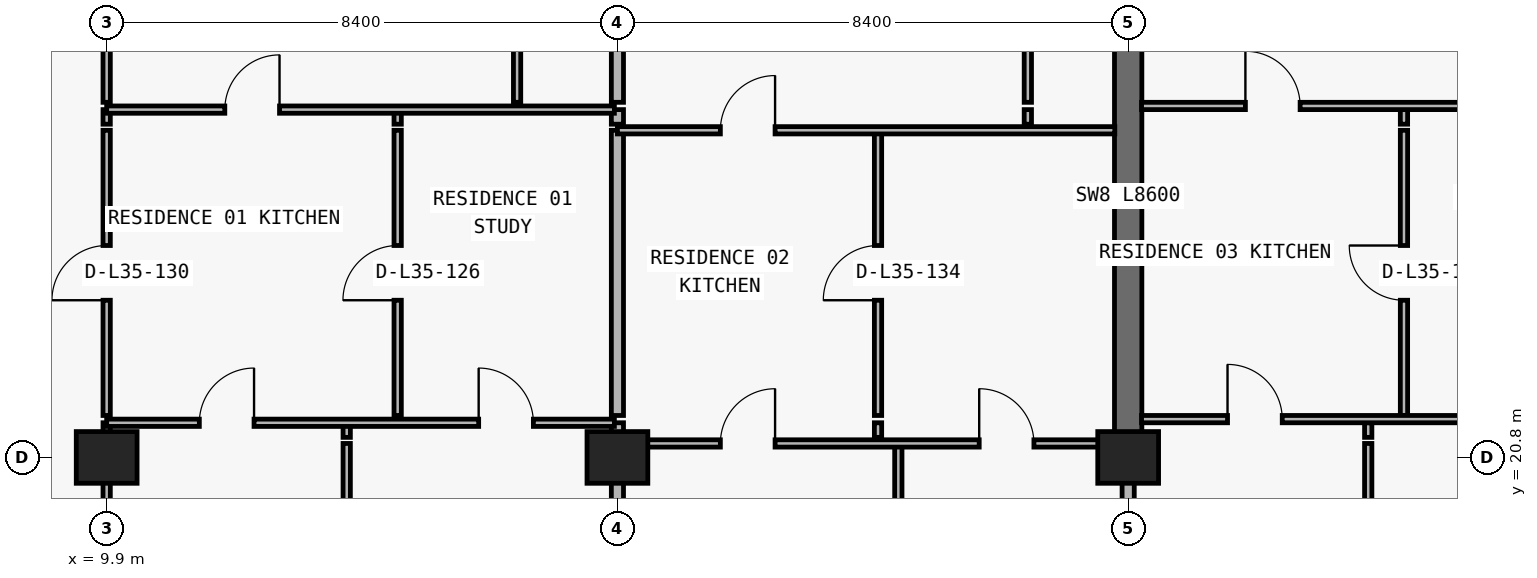
"""IFC4 building model, lengths in metres.
Left out: names, types, materials, properties, quantities, classifications, styles, units other than length and angle.
Written with IfcOpenShell. Run it as: python <this file> out.ifc"""

import sys

from ifc_helpers import new_model, si_unit, direction, frame, frame_2d, origin, origin_2d, place, context, subcontext, project, spatial, rectangle, extrude, element, fill, save


model = new_model("IFC4")
c1 = context("Model", 3, precision=1e-05, world=origin(), true_north=direction((0.0, 1.0)))
c2 = subcontext(c1, "Body", "Model", "MODEL_VIEW")
j1 = project(units=[si_unit("LENGTHUNIT", "METRE"), si_unit("PLANEANGLEUNIT", "RADIAN")], contexts=[c1])
p1 = place(None, origin())
s1 = spatial("IfcSite", under=j1, at=p1, CompositionType="ELEMENT")
p2 = place(p1, origin())
s2 = spatial("IfcBuilding", under=s1, at=p2, CompositionType="ELEMENT")
p3 = place(p2, frame((0.0, 0.0, 129.0)))
s3 = spatial("IfcBuildingStorey", under=s2, at=p3, CompositionType="ELEMENT", Elevation=129.0)
for number, where, z_axis, x_axis in (
    (1, (9.9, 20.8, 0.0), (0.0, 0.0, 1.0), (1.0, 0.0, 0.0)),
    (2, (18.3, 20.8, 0.0), (0.0, 0.0, 1.0), (1.0, 0.0, 0.0)),
    (3, (26.7, 20.8, 0.0), (0.0, 0.0, 1.0), (1.0, 0.0, 0.0)),
):
    element("IfcColumn", number, at=place(p3, frame(where, z_axis=z_axis, x_axis=x_axis)), inside=s3, PredefinedType="COLUMN", context=c2, shape_type="SweptSolid", body=[
        extrude(rectangle(XDim=1.0, YDim=0.85, at=origin_2d()), origin(), (0.0, 0.0, 1.0), 3.05),
    ])
p4 = place(p3, frame((26.7, 20.8, 0.0), z_axis=(0.0, 0.0, 1.0), x_axis=(0.0, 1.0, 0.0)))
e4 = element("IfcWall", 4, at=p4, inside=s3, PredefinedType="SHEAR", context=c2, shape_type="SweptSolid", body=[
    extrude(rectangle(XDim=8.6, YDim=0.45, at=frame_2d((4.3, 0.0))), origin(), (0.0, 0.0, 1.0), 3.05),
])
p5 = place(p3, frame((9.9, 8.84, 0.0), z_axis=(0.0, 0.0, 1.0), x_axis=(0.0, 1.0, 0.0)))
e5 = element("IfcWall", 5, at=p5, inside=s3, PredefinedType="PARTITIONING", context=c2, shape_type="SweptSolid", body=[
    extrude(rectangle(XDim=12.19, YDim=0.12, at=frame_2d((6.095, 0.0))), origin(), (0.0, 0.0, 1.0), 2.174),
])
p6 = place(p3, frame((9.9, 21.13, 0.0), z_axis=(0.0, 0.0, 1.0), x_axis=(0.0, 1.0, 0.0)))
e6 = element("IfcWall", 6, at=p6, inside=s3, PredefinedType="PARTITIONING", context=c2, shape_type="SweptSolid", body=[
    extrude(rectangle(XDim=0.24, YDim=0.12, at=frame_2d((0.12, 0.0))), origin(), (0.0, 0.0, 1.0), 2.174),
])
p7 = place(p3, frame((9.9, 21.49, 0.0), z_axis=(0.0, 0.0, 1.0), x_axis=(0.0, 1.0, 0.0)))
e7 = element("IfcWall", 7, at=p7, inside=s3, PredefinedType="PARTITIONING", context=c2, shape_type="SweptSolid", body=[
    extrude(rectangle(XDim=4.69, YDim=0.12, at=frame_2d((2.345, 0.0))), origin(), (0.0, 0.0, 1.0), 2.174),
])
p8 = place(p7, frame((1.895, 0.0, 0.0)))
e8 = element("IfcOpeningElement", 8, at=p8, cuts=e7, PredefinedType="OPENING", context=c2, shape_type="SweptSolid", body=[
    extrude(rectangle(XDim=0.9, YDim=2.124, at=frame_2d((0.45, 1.062))), frame((0.0, 0.07, 0.0), z_axis=(0.0, -1.0, 0.0), x_axis=(1.0, 0.0, 0.0)), (0.0, 0.0, 1.0), 0.14),
])
p9 = place(p3, frame((9.9, 26.28, 0.0), z_axis=(0.0, 0.0, 1.0), x_axis=(0.0, 1.0, 0.0)))
e9 = element("IfcWall", 9, at=p9, inside=s3, PredefinedType="PARTITIONING", context=c2, shape_type="SweptSolid", body=[
    extrude(rectangle(XDim=0.24, YDim=0.12, at=frame_2d((0.12, 0.0))), origin(), (0.0, 0.0, 1.0), 2.174),
])
p10 = place(p3, frame((9.9, 26.64, 0.0), z_axis=(0.0, 0.0, 1.0), x_axis=(0.0, 1.0, 0.0)))
e10 = element("IfcWall", 10, at=p10, inside=s3, PredefinedType="PARTITIONING", context=c2, shape_type="SweptSolid", body=[
    extrude(rectangle(XDim=8.06, YDim=0.12, at=frame_2d((4.03, 0.0))), origin(), (0.0, 0.0, 1.0), 2.174),
])
p11 = place(p3, frame((13.848, 8.84, 0.0), z_axis=(0.0, 0.0, 1.0), x_axis=(0.0, 1.0, 0.0)))
e11 = element("IfcWall", 11, at=p11, inside=s3, PredefinedType="PARTITIONING", context=c2, shape_type="SweptSolid", body=[
    extrude(rectangle(XDim=12.19, YDim=0.12, at=frame_2d((6.095, 0.0))), origin(), (0.0, 0.0, 1.0), 3.05),
])
p12 = place(p3, frame((13.848, 21.13, 0.0), z_axis=(0.0, 0.0, 1.0), x_axis=(0.0, 1.0, 0.0)))
e12 = element("IfcWall", 12, at=p12, inside=s3, PredefinedType="PARTITIONING", context=c2, shape_type="SweptSolid", body=[
    extrude(rectangle(XDim=0.24, YDim=0.12, at=frame_2d((0.12, 0.0))), origin(), (0.0, 0.0, 1.0), 3.05),
])
p13 = place(p3, frame((14.686, 21.49, 0.0), z_axis=(0.0, 0.0, 1.0), x_axis=(0.0, 1.0, 0.0)))
e13 = element("IfcWall", 13, at=p13, inside=s3, PredefinedType="PARTITIONING", context=c2, shape_type="SweptSolid", body=[
    extrude(rectangle(XDim=4.69, YDim=0.12, at=frame_2d((2.345, 0.0))), origin(), (0.0, 0.0, 1.0), 3.05),
])
p14 = place(p13, frame((1.895, 0.0, 0.0)))
e14 = element("IfcOpeningElement", 14, at=p14, cuts=e13, PredefinedType="OPENING", context=c2, shape_type="SweptSolid", body=[
    extrude(rectangle(XDim=0.9, YDim=2.15, at=frame_2d((0.45, 1.075))), frame((0.0, 0.07, 0.0), z_axis=(0.0, -1.0, 0.0), x_axis=(1.0, 0.0, 0.0)), (0.0, 0.0, 1.0), 0.14),
])
p15 = place(p3, frame((14.686, 26.28, 0.0), z_axis=(0.0, 0.0, 1.0), x_axis=(0.0, 1.0, 0.0)))
e15 = element("IfcWall", 15, at=p15, inside=s3, PredefinedType="PARTITIONING", context=c2, shape_type="SweptSolid", body=[
    extrude(rectangle(XDim=0.24, YDim=0.12, at=frame_2d((0.12, 0.0))), origin(), (0.0, 0.0, 1.0), 3.05),
])
p16 = place(p3, frame((16.65, 26.64, 0.0), z_axis=(0.0, 0.0, 1.0), x_axis=(0.0, 1.0, 0.0)))
e16 = element("IfcWall", 16, at=p16, inside=s3, PredefinedType="PARTITIONING", context=c2, shape_type="SweptSolid", body=[
    extrude(rectangle(XDim=8.06, YDim=0.12, at=frame_2d((4.03, 0.0))), origin(), (0.0, 0.0, 1.0), 3.05),
])
p17 = place(p16, frame((3.755, 0.0, 0.0)))
e17 = element("IfcOpeningElement", 17, at=p17, cuts=e16, PredefinedType="OPENING", context=c2, shape_type="SweptSolid", body=[
    extrude(rectangle(XDim=0.85, YDim=2.1, at=frame_2d((0.425, 1.05))), frame((0.0, 0.07, 0.0), z_axis=(0.0, -1.0, 0.0), x_axis=(1.0, 0.0, 0.0)), (0.0, 0.0, 1.0), 0.14),
])
p18 = place(p3, frame((18.3, 8.84, 0.0), z_axis=(0.0, 0.0, 1.0), x_axis=(0.0, 1.0, 0.0)))
e18 = element("IfcWall", 18, at=p18, inside=s3, PredefinedType="PARTITIONING", context=c2, shape_type="SweptSolid", body=[
    extrude(rectangle(XDim=12.19, YDim=0.2, at=frame_2d((6.095, 0.0))), origin(), (0.0, 0.0, 1.0), 2.174),
])
p19 = place(p3, frame((18.3, 21.13, 0.0), z_axis=(0.0, 0.0, 1.0), x_axis=(0.0, 1.0, 0.0)))
e19 = element("IfcWall", 19, at=p19, inside=s3, PredefinedType="PARTITIONING", context=c2, shape_type="SweptSolid", body=[
    extrude(rectangle(XDim=0.24, YDim=0.2, at=frame_2d((0.12, 0.0))), origin(), (0.0, 0.0, 1.0), 2.174),
])
p20 = place(p3, frame((18.3, 21.49, 0.0), z_axis=(0.0, 0.0, 1.0), x_axis=(0.0, 1.0, 0.0)))
e20 = element("IfcWall", 20, at=p20, inside=s3, PredefinedType="PARTITIONING", context=c2, shape_type="SweptSolid", body=[
    extrude(rectangle(XDim=4.69, YDim=0.2, at=frame_2d((2.345, 0.0))), origin(), (0.0, 0.0, 1.0), 2.174),
])
p21 = place(p3, frame((18.3, 26.28, 0.0), z_axis=(0.0, 0.0, 1.0), x_axis=(0.0, 1.0, 0.0)))
e21 = element("IfcWall", 21, at=p21, inside=s3, PredefinedType="PARTITIONING", context=c2, shape_type="SweptSolid", body=[
    extrude(rectangle(XDim=0.24, YDim=0.2, at=frame_2d((0.12, 0.0))), origin(), (0.0, 0.0, 1.0), 2.174),
])
p22 = place(p3, frame((18.3, 26.64, 0.0), z_axis=(0.0, 0.0, 1.0), x_axis=(0.0, 1.0, 0.0)))
e22 = element("IfcWall", 22, at=p22, inside=s3, PredefinedType="PARTITIONING", context=c2, shape_type="SweptSolid", body=[
    extrude(rectangle(XDim=8.06, YDim=0.2, at=frame_2d((4.03, 0.0))), origin(), (0.0, 0.0, 1.0), 2.174),
])
p23 = place(p3, frame((22.586, 21.13, 0.0), z_axis=(0.0, 0.0, 1.0), x_axis=(0.0, 1.0, 0.0)))
e23 = element("IfcWall", 23, at=p23, inside=s3, PredefinedType="PARTITIONING", context=c2, shape_type="SweptSolid", body=[
    extrude(rectangle(XDim=0.24, YDim=0.12, at=frame_2d((0.12, 0.0))), origin(), (0.0, 0.0, 1.0), 3.05),
])
p24 = place(p3, frame((22.586, 21.49, 0.0), z_axis=(0.0, 0.0, 1.0), x_axis=(0.0, 1.0, 0.0)))
e24 = element("IfcWall", 24, at=p24, inside=s3, PredefinedType="PARTITIONING", context=c2, shape_type="SweptSolid", body=[
    extrude(rectangle(XDim=4.69, YDim=0.12, at=frame_2d((2.345, 0.0))), origin(), (0.0, 0.0, 1.0), 3.05),
])
p25 = place(p24, frame((1.895, 0.0, 0.0)))
e25 = element("IfcOpeningElement", 25, at=p25, cuts=e24, PredefinedType="OPENING", context=c2, shape_type="SweptSolid", body=[
    extrude(rectangle(XDim=0.9, YDim=2.15, at=frame_2d((0.45, 1.075))), frame((0.0, 0.07, 0.0), z_axis=(0.0, -1.0, 0.0), x_axis=(1.0, 0.0, 0.0)), (0.0, 0.0, 1.0), 0.14),
])
p26 = place(p3, frame((22.92, 8.84, 0.0), z_axis=(0.0, 0.0, 1.0), x_axis=(0.0, 1.0, 0.0)))
e26 = element("IfcWall", 26, at=p26, inside=s3, PredefinedType="PARTITIONING", context=c2, shape_type="SweptSolid", body=[
    extrude(rectangle(XDim=12.19, YDim=0.12, at=frame_2d((6.095, 0.0))), origin(), (0.0, 0.0, 1.0), 3.05),
])
p27 = place(p3, frame((25.05, 26.28, 0.0), z_axis=(0.0, 0.0, 1.0), x_axis=(0.0, 1.0, 0.0)))
e27 = element("IfcWall", 27, at=p27, inside=s3, PredefinedType="PARTITIONING", context=c2, shape_type="SweptSolid", body=[
    extrude(rectangle(XDim=0.24, YDim=0.12, at=frame_2d((0.12, 0.0))), origin(), (0.0, 0.0, 1.0), 3.05),
])
p28 = place(p3, frame((25.05, 26.64, 0.0), z_axis=(0.0, 0.0, 1.0), x_axis=(0.0, 1.0, 0.0)))
e28 = element("IfcWall", 28, at=p28, inside=s3, PredefinedType="PARTITIONING", context=c2, shape_type="SweptSolid", body=[
    extrude(rectangle(XDim=8.06, YDim=0.12, at=frame_2d((4.03, 0.0))), origin(), (0.0, 0.0, 1.0), 3.05),
])
p29 = place(p28, frame((3.755, 0.0, 0.0)))
e29 = element("IfcOpeningElement", 29, at=p29, cuts=e28, PredefinedType="OPENING", context=c2, shape_type="SweptSolid", body=[
    extrude(rectangle(XDim=0.85, YDim=2.1, at=frame_2d((0.425, 1.05))), frame((0.0, 0.07, 0.0), z_axis=(0.0, -1.0, 0.0), x_axis=(1.0, 0.0, 0.0)), (0.0, 0.0, 1.0), 0.14),
])
p30 = place(p3, frame((26.7, 8.84, 0.0), z_axis=(0.0, 0.0, 1.0), x_axis=(0.0, 1.0, 0.0)))
e30 = element("IfcWall", 30, at=p30, inside=s3, PredefinedType="PARTITIONING", context=c2, shape_type="SweptSolid", body=[
    extrude(rectangle(XDim=11.955, YDim=0.2, at=frame_2d((5.978, 0.0))), origin(), (0.0, 0.0, 1.0), 2.174),
])
p31 = place(p3, frame((30.648, 8.84, 0.0), z_axis=(0.0, 0.0, 1.0), x_axis=(0.0, 1.0, 0.0)))
e31 = element("IfcWall", 31, at=p31, inside=s3, PredefinedType="PARTITIONING", context=c2, shape_type="SweptSolid", body=[
    extrude(rectangle(XDim=12.19, YDim=0.12, at=frame_2d((6.095, 0.0))), origin(), (0.0, 0.0, 1.0), 3.05),
])
p32 = place(p3, frame((30.648, 21.13, 0.0), z_axis=(0.0, 0.0, 1.0), x_axis=(0.0, 1.0, 0.0)))
e32 = element("IfcWall", 32, at=p32, inside=s3, PredefinedType="PARTITIONING", context=c2, shape_type="SweptSolid", body=[
    extrude(rectangle(XDim=0.24, YDim=0.12, at=frame_2d((0.12, 0.0))), origin(), (0.0, 0.0, 1.0), 3.05),
])
p33 = place(p3, frame((31.236, 21.49, 0.0), z_axis=(0.0, 0.0, 1.0), x_axis=(0.0, 1.0, 0.0)))
e33 = element("IfcWall", 33, at=p33, inside=s3, PredefinedType="PARTITIONING", context=c2, shape_type="SweptSolid", body=[
    extrude(rectangle(XDim=4.69, YDim=0.12, at=frame_2d((2.345, 0.0))), origin(), (0.0, 0.0, 1.0), 3.05),
])
p34 = place(p33, frame((1.895, 0.0, 0.0)))
e34 = element("IfcOpeningElement", 34, at=p34, cuts=e33, PredefinedType="OPENING", context=c2, shape_type="SweptSolid", body=[
    extrude(rectangle(XDim=0.9, YDim=2.15, at=frame_2d((0.45, 1.075))), frame((0.0, 0.07, 0.0), z_axis=(0.0, -1.0, 0.0), x_axis=(1.0, 0.0, 0.0)), (0.0, 0.0, 1.0), 0.14),
])
p35 = place(p3, frame((31.236, 26.28, 0.0), z_axis=(0.0, 0.0, 1.0), x_axis=(0.0, 1.0, 0.0)))
e35 = element("IfcWall", 35, at=p35, inside=s3, PredefinedType="PARTITIONING", context=c2, shape_type="SweptSolid", body=[
    extrude(rectangle(XDim=0.24, YDim=0.12, at=frame_2d((0.12, 0.0))), origin(), (0.0, 0.0, 1.0), 3.05),
])
p36 = place(p3, frame((18.3, 21.03, 0.0), z_axis=(0.0, 0.0, 1.0), x_axis=(1.0, 0.0, 0.0)))
e36 = element("IfcWall", 36, at=p36, inside=s3, PredefinedType="PARTITIONING", context=c2, shape_type="SweptSolid", body=[
    extrude(rectangle(XDim=8.18, YDim=0.12, at=frame_2d((4.09, 0.0))), origin(), (0.0, 0.0, 1.0), 2.174),
])
p37 = place(p36, frame((1.693, 0.0, 0.0)))
e37 = element("IfcOpeningElement", 37, at=p37, cuts=e36, PredefinedType="OPENING", context=c2, shape_type="SweptSolid", body=[
    extrude(rectangle(XDim=0.9, YDim=2.124, at=frame_2d((0.45, 1.062))), frame((0.0, 0.07, 0.0), z_axis=(0.0, -1.0, 0.0), x_axis=(1.0, 0.0, 0.0)), (0.0, 0.0, 1.0), 0.14),
])
p38 = place(p36, frame((5.95, 0.0, 0.0)))
e38 = element("IfcOpeningElement", 38, at=p38, cuts=e36, PredefinedType="OPENING", context=c2, shape_type="SweptSolid", body=[
    extrude(rectangle(XDim=0.9, YDim=2.124, at=frame_2d((0.45, 1.062))), frame((0.0, 0.07, 0.0), z_axis=(0.0, -1.0, 0.0), x_axis=(1.0, 0.0, 0.0)), (0.0, 0.0, 1.0), 0.14),
])
p39 = place(p3, frame((9.9, 21.37, 0.0), z_axis=(0.0, 0.0, 1.0), x_axis=(1.0, 0.0, 0.0)))
e39 = element("IfcWall", 39, at=p39, inside=s3, PredefinedType="PARTITIONING", context=c2, shape_type="SweptSolid", body=[
    extrude(rectangle(XDim=8.35, YDim=0.12, at=frame_2d((4.175, 0.0))), origin(), (0.0, 0.0, 1.0), 3.05),
])
p40 = place(p39, frame((1.524, 0.0, 0.0)))
e40 = element("IfcOpeningElement", 40, at=p40, cuts=e39, PredefinedType="OPENING", context=c2, shape_type="SweptSolid", body=[
    extrude(rectangle(XDim=0.9, YDim=2.15, at=frame_2d((0.45, 1.075))), frame((0.0, 0.07, 0.0), z_axis=(0.0, -1.0, 0.0), x_axis=(1.0, 0.0, 0.0)), (0.0, 0.0, 1.0), 0.14),
])
p41 = place(p39, frame((6.118, 0.0, 0.0)))
e41 = element("IfcOpeningElement", 41, at=p41, cuts=e39, PredefinedType="OPENING", context=c2, shape_type="SweptSolid", body=[
    extrude(rectangle(XDim=0.9, YDim=2.15, at=frame_2d((0.45, 1.075))), frame((0.0, 0.07, 0.0), z_axis=(0.0, -1.0, 0.0), x_axis=(1.0, 0.0, 0.0)), (0.0, 0.0, 1.0), 0.14),
])
p42 = place(p3, frame((26.92, 21.43, 0.0), z_axis=(0.0, 0.0, 1.0), x_axis=(1.0, 0.0, 0.0)))
e42 = element("IfcWall", 42, at=p42, inside=s3, PredefinedType="PARTITIONING", context=c2, shape_type="SweptSolid", body=[
    extrude(rectangle(XDim=8.18, YDim=0.12, at=frame_2d((4.09, 0.0))), origin(), (0.0, 0.0, 1.0), 3.05),
])
p43 = place(p42, frame((1.414, 0.0, 0.0)))
e43 = element("IfcOpeningElement", 43, at=p43, cuts=e42, PredefinedType="OPENING", context=c2, shape_type="SweptSolid", body=[
    extrude(rectangle(XDim=0.9, YDim=2.15, at=frame_2d((0.45, 1.075))), frame((0.0, 0.07, 0.0), z_axis=(0.0, -1.0, 0.0), x_axis=(1.0, 0.0, 0.0)), (0.0, 0.0, 1.0), 0.14),
])
p44 = place(p42, frame((5.798, 0.0, 0.0)))
e44 = element("IfcOpeningElement", 44, at=p44, cuts=e42, PredefinedType="OPENING", context=c2, shape_type="SweptSolid", body=[
    extrude(rectangle(XDim=0.9, YDim=2.15, at=frame_2d((0.45, 1.075))), frame((0.0, 0.07, 0.0), z_axis=(0.0, -1.0, 0.0), x_axis=(1.0, 0.0, 0.0)), (0.0, 0.0, 1.0), 0.14),
])
p45 = place(p3, frame((18.3, 26.18, 0.0), z_axis=(0.0, 0.0, 1.0), x_axis=(1.0, 0.0, 0.0)))
e45 = element("IfcWall", 45, at=p45, inside=s3, PredefinedType="PARTITIONING", context=c2, shape_type="SweptSolid", body=[
    extrude(rectangle(XDim=8.18, YDim=0.12, at=frame_2d((4.09, 0.0))), origin(), (0.0, 0.0, 1.0), 3.05),
])
p46 = place(p45, frame((1.693, 0.0, 0.0)))
e46 = element("IfcOpeningElement", 46, at=p46, cuts=e45, PredefinedType="OPENING", context=c2, shape_type="SweptSolid", body=[
    extrude(rectangle(XDim=0.9, YDim=2.15, at=frame_2d((0.45, 1.075))), frame((0.0, 0.07, 0.0), z_axis=(0.0, -1.0, 0.0), x_axis=(1.0, 0.0, 0.0)), (0.0, 0.0, 1.0), 0.14),
])
p47 = place(p3, frame((9.9, 26.52, 0.0), z_axis=(0.0, 0.0, 1.0), x_axis=(1.0, 0.0, 0.0)))
e47 = element("IfcWall", 47, at=p47, inside=s3, PredefinedType="PARTITIONING", context=c2, shape_type="SweptSolid", body=[
    extrude(rectangle(XDim=8.35, YDim=0.12, at=frame_2d((4.175, 0.0))), origin(), (0.0, 0.0, 1.0), 3.05),
])
p48 = place(p47, frame((1.943, 0.0, 0.0)))
e48 = element("IfcOpeningElement", 48, at=p48, cuts=e47, PredefinedType="OPENING", context=c2, shape_type="SweptSolid", body=[
    extrude(rectangle(XDim=0.9, YDim=2.15, at=frame_2d((0.45, 1.075))), frame((0.0, 0.07, 0.0), z_axis=(0.0, -1.0, 0.0), x_axis=(1.0, 0.0, 0.0)), (0.0, 0.0, 1.0), 0.14),
])
p49 = place(p3, frame((26.92, 26.58, 0.0), z_axis=(0.0, 0.0, 1.0), x_axis=(1.0, 0.0, 0.0)))
e49 = element("IfcWall", 49, at=p49, inside=s3, PredefinedType="PARTITIONING", context=c2, shape_type="SweptSolid", body=[
    extrude(rectangle(XDim=8.18, YDim=0.12, at=frame_2d((4.09, 0.0))), origin(), (0.0, 0.0, 1.0), 3.05),
])
p50 = place(p49, frame((1.708, 0.0, 0.0)))
e50 = element("IfcOpeningElement", 50, at=p50, cuts=e49, PredefinedType="OPENING", context=c2, shape_type="SweptSolid", body=[
    extrude(rectangle(XDim=0.9, YDim=2.15, at=frame_2d((0.45, 1.075))), frame((0.0, 0.07, 0.0), z_axis=(0.0, -1.0, 0.0), x_axis=(1.0, 0.0, 0.0)), (0.0, 0.0, 1.0), 0.14),
])
p51 = place(p48, origin())
e51 = element("IfcDoor", 51, at=p51, inside=s3, OperationType="SINGLE_SWING_RIGHT", PredefinedType="DOOR", context=c2, shape_type="SweptSolid", body=[
    extrude(rectangle(XDim=0.9, YDim=2.15, at=frame_2d((0.45, 1.075))), frame((0.0, 0.025, 0.0), z_axis=(0.0, -1.0, 0.0), x_axis=(1.0, 0.0, 0.0)), (0.0, 0.0, 1.0), 0.05),
])
fill(e48, e51)
p52 = place(p14, origin())
e52 = element("IfcDoor", 52, at=p52, inside=s3, OperationType="SINGLE_SWING_LEFT", PredefinedType="DOOR", context=c2, shape_type="SweptSolid", body=[
    extrude(rectangle(XDim=0.9, YDim=2.15, at=frame_2d((0.45, 1.075))), frame((0.0, 0.025, 0.0), z_axis=(0.0, -1.0, 0.0), x_axis=(1.0, 0.0, 0.0)), (0.0, 0.0, 1.0), 0.05),
])
fill(e14, e52)
p53 = place(p40, origin())
e53 = element("IfcDoor", 53, at=p53, inside=s3, OperationType="SINGLE_SWING_RIGHT", PredefinedType="DOOR", context=c2, shape_type="SweptSolid", body=[
    extrude(rectangle(XDim=0.9, YDim=2.15, at=frame_2d((0.45, 1.075))), frame((0.0, 0.025, 0.0), z_axis=(0.0, -1.0, 0.0), x_axis=(1.0, 0.0, 0.0)), (0.0, 0.0, 1.0), 0.05),
])
fill(e40, e53)
p54 = place(p41, origin())
e54 = element("IfcDoor", 54, at=p54, inside=s3, OperationType="SINGLE_SWING_LEFT", PredefinedType="DOOR", context=c2, shape_type="SweptSolid", body=[
    extrude(rectangle(XDim=0.9, YDim=2.15, at=frame_2d((0.45, 1.075))), frame((0.0, 0.025, 0.0), z_axis=(0.0, -1.0, 0.0), x_axis=(1.0, 0.0, 0.0)), (0.0, 0.0, 1.0), 0.05),
])
fill(e41, e54)
p55 = place(p8, origin())
e55 = element("IfcDoor", 55, at=p55, inside=s3, OperationType="SINGLE_SWING_LEFT", PredefinedType="DOOR", context=c2, shape_type="SweptSolid", body=[
    extrude(rectangle(XDim=0.9, YDim=2.124, at=frame_2d((0.45, 1.062))), frame((0.0, 0.025, 0.0), z_axis=(0.0, -1.0, 0.0), x_axis=(1.0, 0.0, 0.0)), (0.0, 0.0, 1.0), 0.05),
])
fill(e8, e55)
p56 = place(p46, origin())
e56 = element("IfcDoor", 56, at=p56, inside=s3, OperationType="SINGLE_SWING_RIGHT", PredefinedType="DOOR", context=c2, shape_type="SweptSolid", body=[
    extrude(rectangle(XDim=0.9, YDim=2.15, at=frame_2d((0.45, 1.075))), frame((0.0, 0.025, 0.0), z_axis=(0.0, -1.0, 0.0), x_axis=(1.0, 0.0, 0.0)), (0.0, 0.0, 1.0), 0.05),
])
fill(e46, e56)
p57 = place(p25, origin())
e57 = element("IfcDoor", 57, at=p57, inside=s3, OperationType="SINGLE_SWING_LEFT", PredefinedType="DOOR", context=c2, shape_type="SweptSolid", body=[
    extrude(rectangle(XDim=0.9, YDim=2.15, at=frame_2d((0.45, 1.075))), frame((0.0, 0.025, 0.0), z_axis=(0.0, -1.0, 0.0), x_axis=(1.0, 0.0, 0.0)), (0.0, 0.0, 1.0), 0.05),
])
fill(e25, e57)
p58 = place(p37, origin())
e58 = element("IfcDoor", 58, at=p58, inside=s3, OperationType="SINGLE_SWING_RIGHT", PredefinedType="DOOR", context=c2, shape_type="SweptSolid", body=[
    extrude(rectangle(XDim=0.9, YDim=2.124, at=frame_2d((0.45, 1.062))), frame((0.0, 0.025, 0.0), z_axis=(0.0, -1.0, 0.0), x_axis=(1.0, 0.0, 0.0)), (0.0, 0.0, 1.0), 0.05),
])
fill(e37, e58)
p59 = place(p38, origin())
e59 = element("IfcDoor", 59, at=p59, inside=s3, OperationType="SINGLE_SWING_LEFT", PredefinedType="DOOR", context=c2, shape_type="SweptSolid", body=[
    extrude(rectangle(XDim=0.9, YDim=2.124, at=frame_2d((0.45, 1.062))), frame((0.0, 0.025, 0.0), z_axis=(0.0, -1.0, 0.0), x_axis=(1.0, 0.0, 0.0)), (0.0, 0.0, 1.0), 0.05),
])
fill(e38, e59)
p60 = place(p50, origin())
e60 = element("IfcDoor", 60, at=p60, inside=s3, OperationType="SINGLE_SWING_LEFT", PredefinedType="DOOR", context=c2, shape_type="SweptSolid", body=[
    extrude(rectangle(XDim=0.9, YDim=2.15, at=frame_2d((0.45, 1.075))), frame((0.0, 0.025, 0.0), z_axis=(0.0, -1.0, 0.0), x_axis=(1.0, 0.0, 0.0)), (0.0, 0.0, 1.0), 0.05),
])
fill(e50, e60)
p61 = place(p34, origin())
e61 = element("IfcDoor", 61, at=p61, inside=s3, OperationType="SINGLE_SWING_RIGHT", PredefinedType="DOOR", context=c2, shape_type="SweptSolid", body=[
    extrude(rectangle(XDim=0.9, YDim=2.15, at=frame_2d((0.45, 1.075))), frame((0.0, 0.025, 0.0), z_axis=(0.0, -1.0, 0.0), x_axis=(1.0, 0.0, 0.0)), (0.0, 0.0, 1.0), 0.05),
])
fill(e34, e61)
p62 = place(p43, origin())
e62 = element("IfcDoor", 62, at=p62, inside=s3, OperationType="SINGLE_SWING_LEFT", PredefinedType="DOOR", context=c2, shape_type="SweptSolid", body=[
    extrude(rectangle(XDim=0.9, YDim=2.15, at=frame_2d((0.45, 1.075))), frame((0.0, 0.025, 0.0), z_axis=(0.0, -1.0, 0.0), x_axis=(1.0, 0.0, 0.0)), (0.0, 0.0, 1.0), 0.05),
])
fill(e43, e62)
save(model, sys.argv[1])
